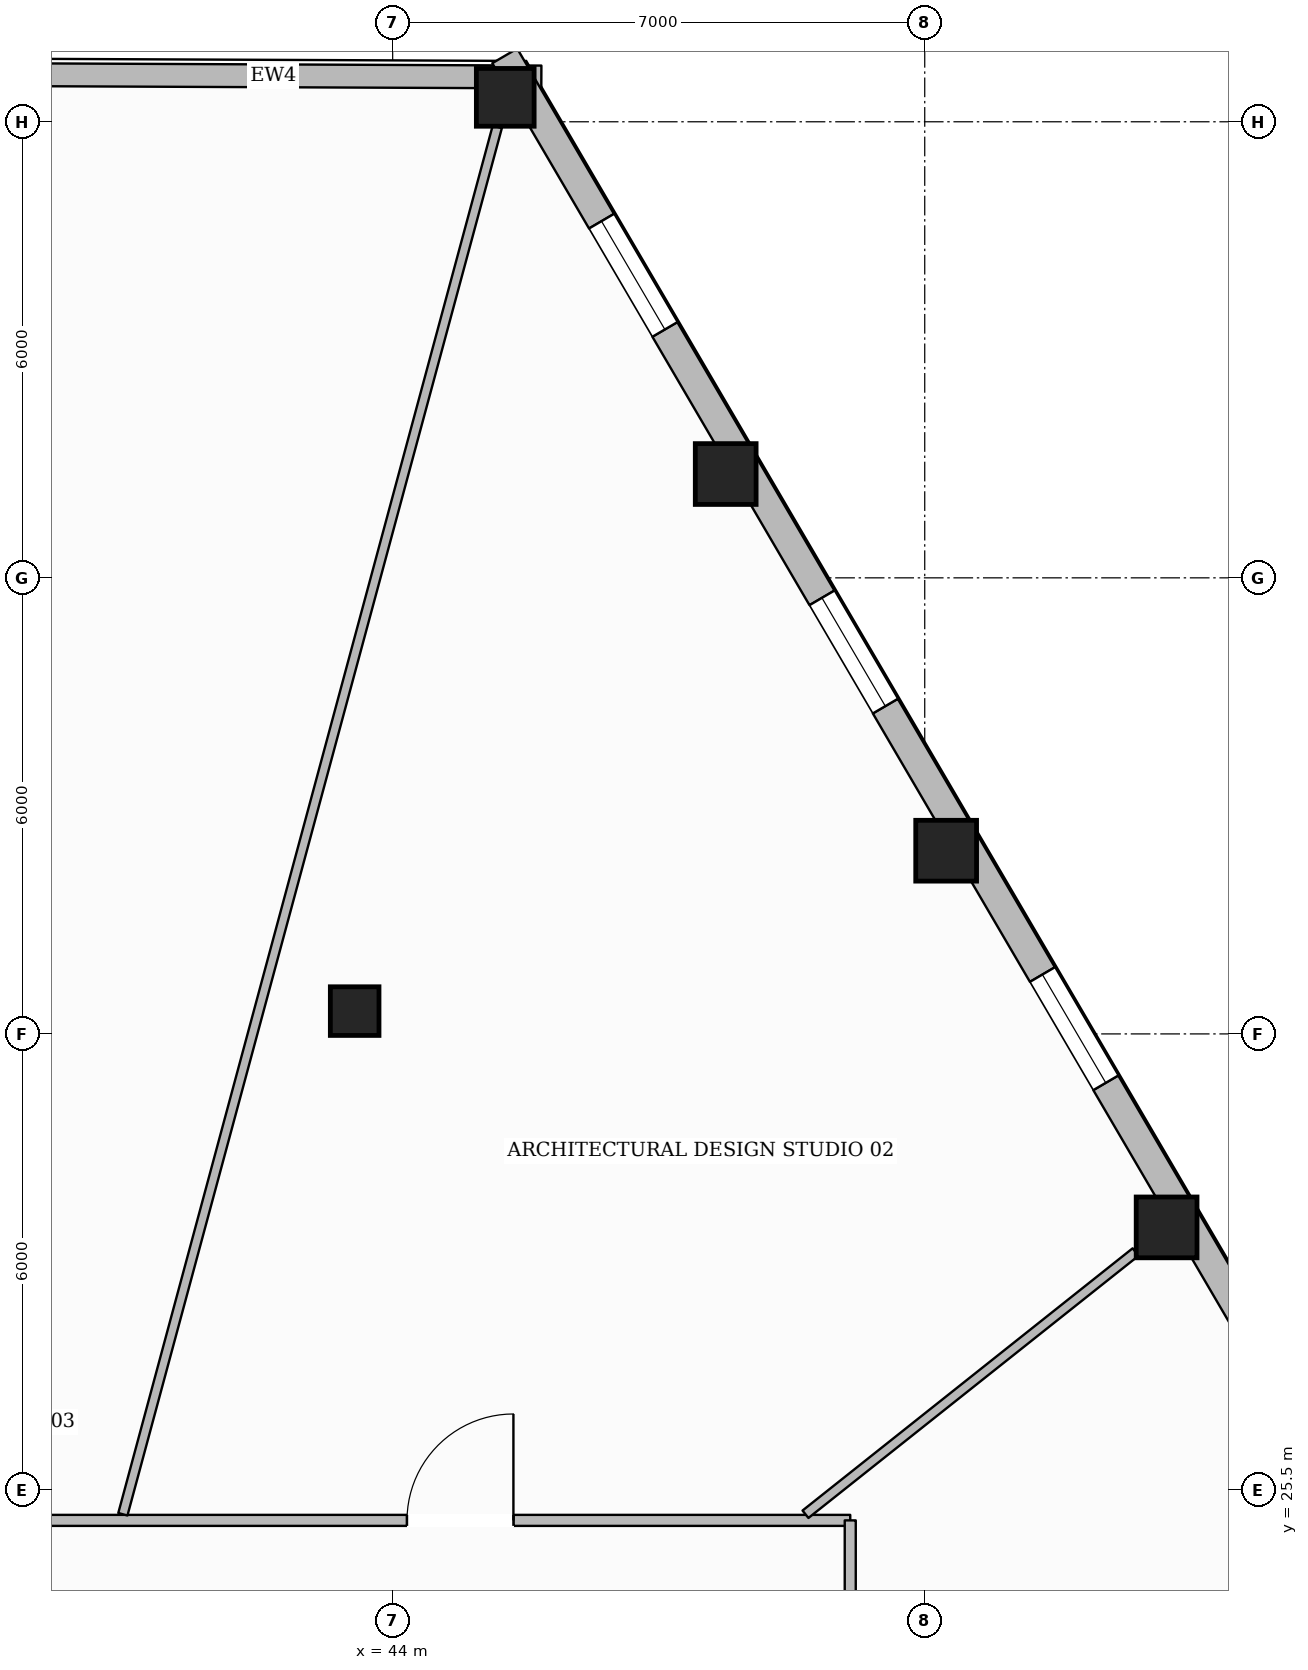
"""IFC4 building model, lengths in metres.
Left out: names, types, materials, properties, quantities, classifications, styles, units other than length and angle.
Written with IfcOpenShell. Run it as: python <this file> out.ifc"""

import sys

from ifc_helpers import new_model, si_unit, direction, frame, frame_2d, origin, origin_2d, place, context, subcontext, project, spatial, rectangle, hollow_rectangle, extrude, element, fill, save


model = new_model("IFC4")
c1 = context("Model", 3, precision=1e-05, world=origin(), true_north=direction((0.0, 1.0)))
c2 = subcontext(c1, "Body", "Model", "MODEL_VIEW")
j1 = project(units=[si_unit("LENGTHUNIT", "METRE"), si_unit("PLANEANGLEUNIT", "RADIAN")], contexts=[c1])
p1 = place(None, origin())
s1 = spatial("IfcSite", under=j1, at=p1, CompositionType="ELEMENT")
p2 = place(p1, origin())
s2 = spatial("IfcBuilding", under=s1, at=p2, CompositionType="ELEMENT")
p3 = place(p2, frame((0.0, 0.0, 52.2)))
s3 = spatial("IfcBuildingStorey", under=s2, at=p3, CompositionType="ELEMENT", Elevation=52.2)
for number, where, z_axis, x_axis in (
    (1, (54.182, 28.955, 0.0), (0.0, 0.0, 1.0), (1.0, 0.0, 0.0)),
    (2, (51.282, 33.91, 0.0), (0.0, 0.0, 1.0), (1.0, 0.0, 0.0)),
    (3, (48.381, 38.866, 0.0), (0.0, 0.0, 1.0), (1.0, 0.0, 0.0)),
):
    element("IfcColumn", number, at=place(p3, frame(where, z_axis=z_axis, x_axis=x_axis)), inside=s3, PredefinedType="COLUMN", context=c2, shape_type="SweptSolid", body=[
        extrude(hollow_rectangle(XDim=0.8, YDim=0.8, WallThickness=0.036, at=origin_2d()), origin(), (0.0, 0.0, 1.0), 3.59),
    ])
p4 = place(p3, frame((45.481, 43.821, 0.0), z_axis=(0.0, 0.0, 1.0), x_axis=(1.0, 0.0, 0.0)))
e4 = element("IfcColumn", 4, at=p4, inside=s3, PredefinedType="COLUMN", context=c2, shape_type="SweptSolid", body=[
    extrude(hollow_rectangle(XDim=0.76, YDim=0.76, WallThickness=0.035, at=origin_2d()), origin(), (0.0, 0.0, 1.0), 3.59),
])
p5 = place(p3, frame((43.5, 31.8, 0.0), z_axis=(0.0, 0.0, 1.0), x_axis=(1.0, 0.0, 0.0)))
e5 = element("IfcColumn", 5, at=p5, inside=s3, PredefinedType="COLUMN", context=c2, shape_type="SweptSolid", body=[
    extrude(hollow_rectangle(XDim=0.64, YDim=0.64, WallThickness=0.028, at=origin_2d()), origin(), (0.0, 0.0, 1.0), 3.59),
])
p6 = place(p3, frame((30.157, 44.157, 0.0), z_axis=(0.0, 0.0, 1.0), x_axis=(0.999990705999, -0.004311370487, 0.0)))
e6 = element("IfcWall", 6, at=p6, inside=s3, PredefinedType="STANDARD", context=c2, shape_type="SweptSolid", body=[
    extrude(rectangle(XDim=15.799, YDim=0.3, at=frame_2d((7.899, 0.0))), origin(), (0.0, 0.0, 1.0), 2.97),
])
p7 = place(p6, frame((7.3, 0.0, 0.65)))
e7 = element("IfcOpeningElement", 7, at=p7, cuts=e6, PredefinedType="OPENING", context=c2, shape_type="SweptSolid", body=[
    extrude(rectangle(XDim=1.2, YDim=1.7, at=frame_2d((0.6, 0.85))), frame((0.0, 0.16, 0.0), z_axis=(0.0, -1.0, 0.0), x_axis=(1.0, 0.0, 0.0)), (0.0, 0.0, 1.0), 0.32),
])
p8 = place(p3, frame((45.475, 44.367, 0.0), z_axis=(0.0, 0.0, 1.0), x_axis=(0.505110430219, -0.863054722068, 0.0)))
e8 = element("IfcWall", 8, at=p8, inside=s3, PredefinedType="STANDARD", context=c2, shape_type="SweptSolid", body=[
    extrude(rectangle(XDim=35.405, YDim=0.38, at=frame_2d((17.703, 0.0))), origin(), (0.0, 0.0, 1.0), 2.97),
])
p9 = place(p8, frame((31.23, 0.0, 0.65)))
e9 = element("IfcOpeningElement", 9, at=p9, cuts=e8, PredefinedType="OPENING", context=c2, shape_type="SweptSolid", body=[
    extrude(rectangle(XDim=1.65, YDim=1.75, at=frame_2d((0.825, 0.875))), frame((0.0, 0.2, 0.0), z_axis=(0.0, -1.0, 0.0), x_axis=(1.0, 0.0, 0.0)), (0.0, 0.0, 1.0), 0.4),
])
p10 = place(p8, frame((25.488, 0.0, 0.65)))
e10 = element("IfcOpeningElement", 10, at=p10, cuts=e8, PredefinedType="OPENING", context=c2, shape_type="SweptSolid", body=[
    extrude(rectangle(XDim=1.65, YDim=1.75, at=frame_2d((0.825, 0.875))), frame((0.0, 0.2, 0.0), z_axis=(0.0, -1.0, 0.0), x_axis=(1.0, 0.0, 0.0)), (0.0, 0.0, 1.0), 0.4),
])
p11 = place(p8, frame((14.004, 0.0, 0.65)))
e11 = element("IfcOpeningElement", 11, at=p11, cuts=e8, PredefinedType="OPENING", context=c2, shape_type="SweptSolid", body=[
    extrude(rectangle(XDim=1.65, YDim=1.75, at=frame_2d((0.825, 0.875))), frame((0.0, 0.2, 0.0), z_axis=(0.0, -1.0, 0.0), x_axis=(1.0, 0.0, 0.0)), (0.0, 0.0, 1.0), 0.4),
])
p12 = place(p8, frame((8.262, 0.0, 0.65)))
e12 = element("IfcOpeningElement", 12, at=p12, cuts=e8, PredefinedType="OPENING", context=c2, shape_type="SweptSolid", body=[
    extrude(rectangle(XDim=1.65, YDim=1.75, at=frame_2d((0.825, 0.875))), frame((0.0, 0.2, 0.0), z_axis=(0.0, -1.0, 0.0), x_axis=(1.0, 0.0, 0.0)), (0.0, 0.0, 1.0), 0.4),
])
p13 = place(p8, frame((2.52, 0.0, 0.65)))
e13 = element("IfcOpeningElement", 13, at=p13, cuts=e8, PredefinedType="OPENING", context=c2, shape_type="SweptSolid", body=[
    extrude(rectangle(XDim=1.65, YDim=1.75, at=frame_2d((0.825, 0.875))), frame((0.0, 0.2, 0.0), z_axis=(0.0, -1.0, 0.0), x_axis=(1.0, 0.0, 0.0)), (0.0, 0.0, 1.0), 0.4),
])
p14 = place(p3, frame((39.0, 25.1, 0.0), z_axis=(0.0, 0.0, 1.0), x_axis=(1.0, 0.0, 0.0)))
e14 = element("IfcWall", 14, at=p14, inside=s3, PredefinedType="PARTITIONING", context=c2, shape_type="SweptSolid", body=[
    extrude(rectangle(XDim=11.02, YDim=0.145, at=frame_2d((5.51, 0.0))), origin(), (0.0, 0.0, 1.0), 3.59),
])
p15 = place(p14, frame((5.189, 0.0, 0.0)))
e15 = element("IfcOpeningElement", 15, at=p15, cuts=e14, PredefinedType="OPENING", context=c2, shape_type="SweptSolid", body=[
    extrude(rectangle(XDim=1.4, YDim=2.2, at=frame_2d((0.7, 1.1))), frame((0.0, 0.083, 0.0), z_axis=(0.0, -1.0, 0.0), x_axis=(1.0, 0.0, 0.0)), (0.0, 0.0, 1.0), 0.165),
])
p16 = place(p3, frame((50.02, 25.1, 0.0), z_axis=(0.0, 0.0, 1.0), x_axis=(0.0, -1.0, 0.0)))
e16 = element("IfcWall", 16, at=p16, inside=s3, PredefinedType="PARTITIONING", context=c2, shape_type="SweptSolid", body=[
    extrude(rectangle(XDim=16.0, YDim=0.145, at=frame_2d((8.0, 0.0))), origin(), (0.0, 0.0, 1.0), 3.278),
])
p17 = place(p16, frame((3.075, 0.0, 0.0)))
e17 = element("IfcOpeningElement", 17, at=p17, cuts=e16, PredefinedType="OPENING", context=c2, shape_type="SweptSolid", body=[
    extrude(rectangle(XDim=1.4, YDim=2.2, at=frame_2d((0.7, 1.1))), frame((0.0, 0.083, 0.0), z_axis=(0.0, -1.0, 0.0), x_axis=(1.0, 0.0, 0.0)), (0.0, 0.0, 1.0), 0.165),
])
p18 = place(p16, frame((9.224, 0.0, 0.0)))
e18 = element("IfcOpeningElement", 18, at=p18, cuts=e16, PredefinedType="OPENING", context=c2, shape_type="SweptSolid", body=[
    extrude(rectangle(XDim=1.4, YDim=2.2, at=frame_2d((0.7, 1.1))), frame((0.0, 0.083, 0.0), z_axis=(0.0, -1.0, 0.0), x_axis=(1.0, 0.0, 0.0)), (0.0, 0.0, 1.0), 0.165),
])
p19 = place(p3, frame((49.431, 25.18, 0.0), z_axis=(0.0, 0.0, 1.0), x_axis=(0.783015635843, 0.622002020917, 0.0)))
e19 = element("IfcWall", 19, at=p19, inside=s3, PredefinedType="PARTITIONING", context=c2, shape_type="SweptSolid", body=[
    extrude(rectangle(XDim=5.547, YDim=0.125, at=frame_2d((2.773, 0.0))), origin(), (0.0, 0.0, 1.0), 3.057),
])
p20 = place(p3, frame((40.45, 25.18, 0.0), z_axis=(0.0, 0.0, 1.0), x_axis=(0.26055415647, 0.965459233498, 0.0)))
e20 = element("IfcWall", 20, at=p20, inside=s3, PredefinedType="PARTITIONING", context=c2, shape_type="SweptSolid", body=[
    extrude(rectangle(XDim=18.906, YDim=0.125, at=frame_2d((9.453, 0.0))), origin(), (0.0, 0.0, 1.0), 3.59),
])
p21 = place(p11, origin())
e21 = element("IfcWindow", 21, at=p21, inside=s3, PartitioningType="SINGLE_PANEL", PredefinedType="WINDOW", context=c2, shape_type="SweptSolid", body=[
    extrude(rectangle(XDim=1.65, YDim=1.75, at=frame_2d((0.825, 0.875))), frame((0.0, 0.03, 0.0), z_axis=(0.0, -1.0, 0.0), x_axis=(1.0, 0.0, 0.0)), (0.0, 0.0, 1.0), 0.06),
])
fill(e11, e21)
p22 = place(p12, origin())
e22 = element("IfcWindow", 22, at=p22, inside=s3, PartitioningType="SINGLE_PANEL", PredefinedType="WINDOW", context=c2, shape_type="SweptSolid", body=[
    extrude(rectangle(XDim=1.65, YDim=1.75, at=frame_2d((0.825, 0.875))), frame((0.0, 0.03, 0.0), z_axis=(0.0, -1.0, 0.0), x_axis=(1.0, 0.0, 0.0)), (0.0, 0.0, 1.0), 0.06),
])
fill(e12, e22)
p23 = place(p13, origin())
e23 = element("IfcWindow", 23, at=p23, inside=s3, PartitioningType="SINGLE_PANEL", PredefinedType="WINDOW", context=c2, shape_type="SweptSolid", body=[
    extrude(rectangle(XDim=1.65, YDim=1.75, at=frame_2d((0.825, 0.875))), frame((0.0, 0.03, 0.0), z_axis=(0.0, -1.0, 0.0), x_axis=(1.0, 0.0, 0.0)), (0.0, 0.0, 1.0), 0.06),
])
fill(e13, e23)
p24 = place(p15, origin())
e24 = element("IfcDoor", 24, at=p24, inside=s3, OperationType="SINGLE_SWING_RIGHT", PredefinedType="DOOR", context=c2, shape_type="SweptSolid", body=[
    extrude(rectangle(XDim=1.4, YDim=2.2, at=frame_2d((0.7, 1.1))), frame((0.0, 0.025, 0.0), z_axis=(0.0, -1.0, 0.0), x_axis=(1.0, 0.0, 0.0)), (0.0, 0.0, 1.0), 0.05),
])
fill(e15, e24)
save(model, sys.argv[1])
